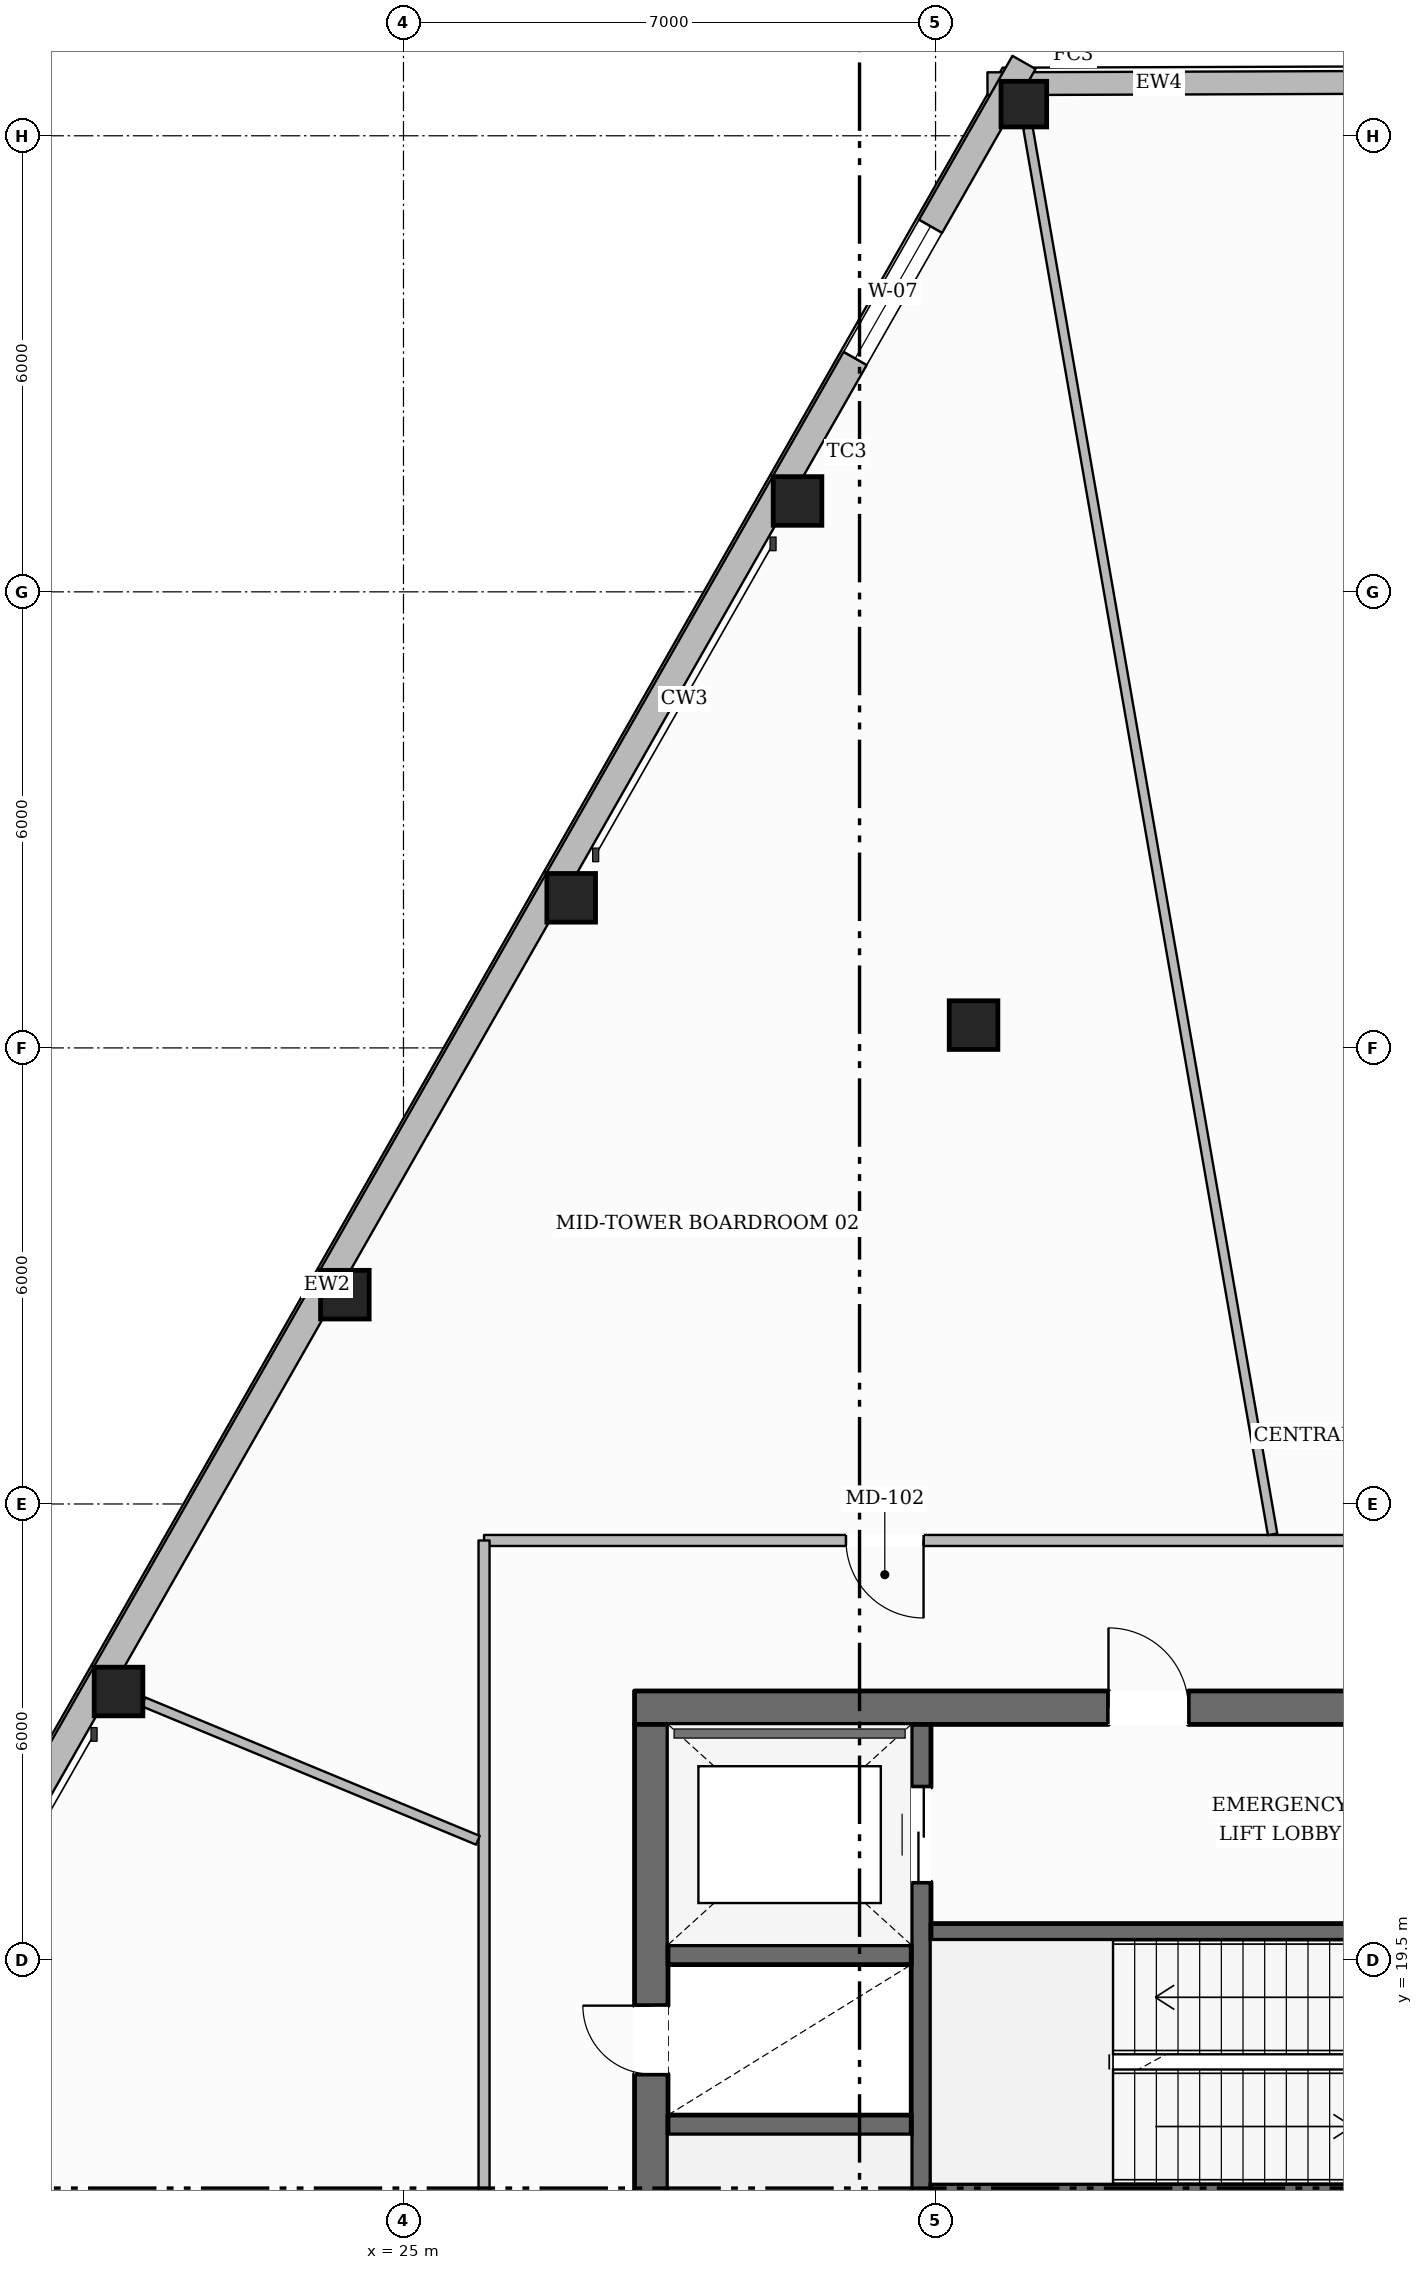
"""IFC4 building model, lengths in metres.
Left out: names, types, materials, properties, quantities, classifications, styles, units other than length and angle.
Written with IfcOpenShell. Run it as: python <this file> out.ifc"""

import sys

from ifc_helpers import new_model, si_unit, direction, frame, frame_2d, origin, origin_2d, place, context, subcontext, project, spatial, rectangle, hollow_rectangle, extrude, element, fill, save


model = new_model("IFC4")
c1 = context("Model", 3, precision=1e-05, world=origin(), true_north=direction((0.0, 1.0)))
c2 = subcontext(c1, "Body", "Model", "MODEL_VIEW")
j1 = project(units=[si_unit("LENGTHUNIT", "METRE"), si_unit("PLANEANGLEUNIT", "RADIAN")], contexts=[c1])
p1 = place(None, origin())
s1 = spatial("IfcSite", under=j1, at=p1, CompositionType="ELEMENT")
p2 = place(p1, origin())
s2 = spatial("IfcBuilding", under=s1, at=p2, CompositionType="ELEMENT")
p3 = place(p2, frame((0.0, 0.0, 160.0)))
s3 = spatial("IfcBuildingStorey", under=s2, at=p3, CompositionType="ELEMENT", Elevation=160.0)
p4 = place(p3, frame((28.04, 22.82, 0.0), z_axis=(0.0, 0.0, 1.0), x_axis=(1.0, 0.0, 0.0)))
e1 = element("IfcWall", 1, at=p4, inside=s3, PredefinedType="SOLIDWALL", context=c2, shape_type="SweptSolid", body=[
    extrude(rectangle(XDim=19.92, YDim=0.44, at=frame_2d((9.96, 0.0))), origin(), (0.0, 0.0, 1.0), 4.75),
])
p5 = place(p4, frame((6.235, 0.0, 0.0)))
e2 = element("IfcOpeningElement", 2, at=p5, cuts=e1, PredefinedType="OPENING", context=c2, shape_type="SweptSolid", body=[
    extrude(rectangle(XDim=1.05, YDim=2.15, at=frame_2d((0.525, 1.075))), frame((0.0, 0.23, 0.0), z_axis=(0.0, -1.0, 0.0), x_axis=(1.0, 0.0, 0.0)), (0.0, 0.0, 1.0), 0.46),
])
p6 = place(p4, frame((12.635, 0.0, 0.0)))
e3 = element("IfcOpeningElement", 3, at=p6, cuts=e1, PredefinedType="OPENING", context=c2, shape_type="SweptSolid", body=[
    extrude(rectangle(XDim=1.05, YDim=2.15, at=frame_2d((0.525, 1.075))), frame((0.0, 0.23, 0.0), z_axis=(0.0, -1.0, 0.0), x_axis=(1.0, 0.0, 0.0)), (0.0, 0.0, 1.0), 0.46),
])
p7 = place(p3, frame((28.26, 9.6, 0.0), z_axis=(0.0, 0.0, 1.0), x_axis=(0.0, 1.0, 0.0)))
e4 = element("IfcWall", 4, at=p7, inside=s3, PredefinedType="SOLIDWALL", context=c2, shape_type="SweptSolid", body=[
    extrude(rectangle(XDim=13.0, YDim=0.44, at=frame_2d((6.5, 0.0))), origin(), (0.0, 0.0, 1.0), 4.75),
])
p8 = place(p7, frame((0.2, 0.0, 0.0)))
e5 = element("IfcOpeningElement", 5, at=p8, cuts=e4, PredefinedType="OPENING", context=c2, shape_type="SweptSolid", body=[
    extrude(rectangle(XDim=1.1, YDim=2.15, at=frame_2d((0.55, 1.075))), frame((0.0, 0.23, 0.0), z_axis=(0.0, -1.0, 0.0), x_axis=(1.0, 0.0, 0.0)), (0.0, 0.0, 1.0), 0.46),
])
p9 = place(p7, frame((8.4, 0.0, 0.0)))
e6 = element("IfcOpeningElement", 6, at=p9, cuts=e4, PredefinedType="OPENING", context=c2, shape_type="SweptSolid", body=[
    extrude(rectangle(XDim=0.9, YDim=2.1, at=frame_2d((0.45, 1.05))), frame((0.0, 0.23, 0.0), z_axis=(0.0, -1.0, 0.0), x_axis=(1.0, 0.0, 0.0)), (0.0, 0.0, 1.0), 0.46),
])
p10 = place(p3, frame((31.81, 9.6, 0.0), z_axis=(0.0, 0.0, 1.0), x_axis=(0.0, 1.0, 0.0)))
e7 = element("IfcWall", 7, at=p10, inside=s3, PredefinedType="SHEAR", context=c2, shape_type="SweptSolid", body=[
    extrude(rectangle(XDim=13.0, YDim=0.26, at=frame_2d((6.5, 0.0))), origin(), (0.0, 0.0, 1.0), 4.75),
])
p11 = place(p10, frame((10.925, 0.0, 0.0)))
e8 = element("IfcOpeningElement", 8, at=p11, cuts=e7, PredefinedType="OPENING", context=c2, shape_type="SweptSolid", body=[
    extrude(rectangle(XDim=1.25, YDim=2.25, at=frame_2d((0.625, 1.125))), frame((0.0, 0.14, 0.0), z_axis=(0.0, -1.0, 0.0), x_axis=(1.0, 0.0, 0.0)), (0.0, 0.0, 1.0), 0.28),
])
for number, where, z_axis, x_axis in (
    (9, (28.48, 17.33, 0.0), (0.0, 0.0, 1.0), (1.0, 0.0, 0.0)),
    (10, (28.48, 19.57, 0.0), (0.0, 0.0, 1.0), (1.0, 0.0, 0.0)),
):
    element("IfcWall", number, at=place(p3, frame(where, z_axis=z_axis, x_axis=x_axis)), inside=s3, PredefinedType="SHEAR", context=c2, shape_type="SweptSolid", body=[
        extrude(rectangle(XDim=3.2, YDim=0.26, at=frame_2d((1.6, 0.0))), origin(), (0.0, 0.0, 1.0), 4.75),
    ])
p12 = place(p3, frame((31.94, 19.87, 0.0), z_axis=(0.0, 0.0, 1.0), x_axis=(1.0, 0.0, 0.0)))
e11 = element("IfcWall", 11, at=p12, inside=s3, PredefinedType="SOLIDWALL", context=c2, shape_type="SweptSolid", body=[
    extrude(rectangle(XDim=12.12, YDim=0.22, at=frame_2d((6.06, 0.0))), origin(), (0.0, 0.0, 1.0), 4.75),
])
p13 = place(p12, frame((6.3, 0.0, 0.0)))
e12 = element("IfcOpeningElement", 12, at=p13, cuts=e11, PredefinedType="OPENING", context=c2, shape_type="SweptSolid", body=[
    extrude(rectangle(XDim=1.1, YDim=2.15, at=frame_2d((0.55, 1.075))), frame((0.0, 0.12, 0.0), z_axis=(0.0, -1.0, 0.0), x_axis=(1.0, 0.0, 0.0)), (0.0, 0.0, 1.0), 0.24),
])
p14 = place(p12, frame((8.61, 0.0, 0.0)))
e13 = element("IfcOpeningElement", 13, at=p14, cuts=e11, PredefinedType="OPENING", context=c2, shape_type="SweptSolid", body=[
    extrude(rectangle(XDim=0.9, YDim=2.1, at=frame_2d((0.45, 1.05))), frame((0.0, 0.12, 0.0), z_axis=(0.0, -1.0, 0.0), x_axis=(1.0, 0.0, 0.0)), (0.0, 0.0, 1.0), 0.24),
])
p15 = place(p12, frame((10.85, 0.0, 0.0)))
e14 = element("IfcOpeningElement", 14, at=p15, cuts=e11, PredefinedType="OPENING", context=c2, shape_type="SweptSolid", body=[
    extrude(rectangle(XDim=0.9, YDim=2.1, at=frame_2d((0.45, 1.05))), frame((0.0, 0.12, 0.0), z_axis=(0.0, -1.0, 0.0), x_axis=(1.0, 0.0, 0.0)), (0.0, 0.0, 1.0), 0.24),
])
p16 = place(p3, frame((31.94, 16.45, 0.0), z_axis=(0.0, 0.0, 1.0), x_axis=(1.0, 0.0, 0.0)))
e15 = element("IfcWall", 15, at=p16, inside=s3, PredefinedType="SOLIDWALL", context=c2, shape_type="SweptSolid", body=[
    extrude(rectangle(XDim=12.12, YDim=0.22, at=frame_2d((6.06, 0.0))), origin(), (0.0, 0.0, 1.0), 4.75),
])
p17 = place(p3, frame((33.162, 43.917, 0.0), z_axis=(0.0, 0.0, 1.0), x_axis=(1.0, 0.0, 0.0)))
e16 = element("IfcColumn", 16, at=p17, inside=s3, PredefinedType="COLUMN", context=c2, shape_type="SweptSolid", body=[
    extrude(hollow_rectangle(XDim=0.6, YDim=0.6, WallThickness=0.028, at=origin_2d()), origin(), (0.0, 0.0, 1.0), 4.75),
])
for number, where, z_axis, x_axis in (
    (17, (30.184, 38.696, 0.0), (0.0, 0.0, 1.0), (1.0, 0.0, 0.0)),
    (18, (27.206, 33.475, 0.0), (0.0, 0.0, 1.0), (1.0, 0.0, 0.0)),
    (19, (24.229, 28.254, 0.0), (0.0, 0.0, 1.0), (1.0, 0.0, 0.0)),
    (20, (21.251, 23.033, 0.0), (0.0, 0.0, 1.0), (1.0, 0.0, 0.0)),
    (21, (32.5, 31.8, 0.0), (0.0, 0.0, 1.0), (1.0, 0.0, 0.0)),
):
    element("IfcColumn", number, at=place(p3, frame(where, z_axis=z_axis, x_axis=x_axis)), inside=s3, PredefinedType="COLUMN", context=c2, shape_type="SweptSolid", body=[
        extrude(hollow_rectangle(XDim=0.64, YDim=0.64, WallThickness=0.028, at=origin_2d()), origin(), (0.0, 0.0, 1.0), 4.75),
    ])
p18 = place(p3, frame((32.683, 44.185, 0.0), z_axis=(0.0, 0.0, 1.0), x_axis=(0.9999942421, 0.003393488933, 0.0)))
e22 = element("IfcWall", 22, at=p18, inside=s3, PredefinedType="STANDARD", context=c2, shape_type="SweptSolid", body=[
    extrude(rectangle(XDim=10.576, YDim=0.3, at=frame_2d((5.288, 0.0))), origin(), (0.0, 0.0, 1.0), 4.282),
])
p19 = place(p18, frame((4.763, 0.0, 0.65)))
e23 = element("IfcOpeningElement", 23, at=p19, cuts=e22, PredefinedType="OPENING", context=c2, shape_type="SweptSolid", body=[
    extrude(rectangle(XDim=1.05, YDim=1.7, at=frame_2d((0.525, 0.85))), frame((0.0, 0.16, 0.0), z_axis=(0.0, -1.0, 0.0), x_axis=(1.0, 0.0, 0.0)), (0.0, 0.0, 1.0), 0.32),
])
p20 = place(p3, frame((14.827, 12.314, 0.0), z_axis=(0.0, 0.0, 1.0), x_axis=(0.495417756307, 0.868654849026, 0.0)))
e24 = element("IfcWall", 24, at=p20, inside=s3, PredefinedType="STANDARD", context=c2, shape_type="SweptSolid", body=[
    extrude(rectangle(XDim=37.012, YDim=0.35, at=frame_2d((18.506, 0.0))), origin(), (0.0, 0.0, 1.0), 4.282),
])
p21 = place(p20, frame((32.53, 0.0, 0.65)))
e25 = element("IfcOpeningElement", 25, at=p21, cuts=e24, PredefinedType="OPENING", context=c2, shape_type="SweptSolid", body=[
    extrude(rectangle(XDim=2.0, YDim=2.25, at=frame_2d((1.0, 1.125))), frame((0.0, 0.185, 0.0), z_axis=(0.0, -1.0, 0.0), x_axis=(1.0, 0.0, 0.0)), (0.0, 0.0, 1.0), 0.37),
])
p22 = place(p20, frame((2.478, 0.0, 0.65)))
e26 = element("IfcOpeningElement", 26, at=p22, cuts=e24, PredefinedType="OPENING", context=c2, shape_type="SweptSolid", body=[
    extrude(rectangle(XDim=2.0, YDim=2.25, at=frame_2d((1.0, 1.125))), frame((0.0, 0.185, 0.0), z_axis=(0.0, -1.0, 0.0), x_axis=(1.0, 0.0, 0.0)), (0.0, 0.0, 1.0), 0.37),
])
p23 = place(p3, frame((49.94, 25.02, 0.0), z_axis=(0.0, 0.0, 1.0), x_axis=(-1.0, 0.0, 0.0)))
e27 = element("IfcWall", 27, at=p23, inside=s3, PredefinedType="PARTITIONING", context=c2, shape_type="SweptSolid", body=[
    extrude(rectangle(XDim=23.88, YDim=0.145, at=frame_2d((11.94, 0.0))), origin(), (0.0, 0.0, 1.0), 4.75),
])
p24 = place(p23, frame((6.138, 0.0, 0.0)))
e28 = element("IfcOpeningElement", 28, at=p24, cuts=e27, PredefinedType="OPENING", context=c2, shape_type="SweptSolid", body=[
    extrude(rectangle(XDim=1.4, YDim=2.2, at=frame_2d((0.7, 1.1))), frame((0.0, 0.083, 0.0), z_axis=(0.0, -1.0, 0.0), x_axis=(1.0, 0.0, 0.0)), (0.0, 0.0, 1.0), 0.165),
])
p25 = place(p23, frame((18.098, 0.0, 0.0)))
e29 = element("IfcOpeningElement", 29, at=p25, cuts=e27, PredefinedType="OPENING", context=c2, shape_type="SweptSolid", body=[
    extrude(rectangle(XDim=1.02, YDim=2.15, at=frame_2d((0.51, 1.075))), frame((0.0, 0.083, 0.0), z_axis=(0.0, -1.0, 0.0), x_axis=(1.0, 0.0, 0.0)), (0.0, 0.0, 1.0), 0.165),
])
p26 = place(p3, frame((26.06, 25.02, 0.0), z_axis=(0.0, 0.0, 1.0), x_axis=(0.0, -1.0, 0.0)))
e30 = element("IfcWall", 30, at=p26, inside=s3, PredefinedType="PARTITIONING", context=c2, shape_type="SweptSolid", body=[
    extrude(rectangle(XDim=17.84, YDim=0.145, at=frame_2d((8.92, 0.0))), origin(), (0.0, 0.0, 1.0), 4.489),
])
p27 = place(p26, frame((9.913, 0.0, 0.0)))
e31 = element("IfcOpeningElement", 31, at=p27, cuts=e30, PredefinedType="OPENING", context=c2, shape_type="SweptSolid", body=[
    extrude(rectangle(XDim=1.02, YDim=2.15, at=frame_2d((0.51, 1.075))), frame((0.0, 0.083, 0.0), z_axis=(0.0, -1.0, 0.0), x_axis=(1.0, 0.0, 0.0)), (0.0, 0.0, 1.0), 0.165),
])
p28 = place(p3, frame((36.435, 25.101, 0.0), z_axis=(0.0, 0.0, 1.0), x_axis=(-0.171366403796, 0.985207366827, 0.0)))
e32 = element("IfcWall", 32, at=p28, inside=s3, PredefinedType="PARTITIONING", context=c2, shape_type="SweptSolid", body=[
    extrude(rectangle(XDim=18.786, YDim=0.125, at=frame_2d((9.393, 0.0))), origin(), (0.0, 0.0, 1.0), 4.291),
])
p29 = place(p3, frame((25.979, 21.075, 0.0), z_axis=(0.0, 0.0, 1.0), x_axis=(-0.923966237797, 0.38247404018, 0.0)))
e33 = element("IfcWall", 33, at=p29, inside=s3, PredefinedType="PARTITIONING", context=c2, shape_type="SweptSolid", body=[
    extrude(rectangle(XDim=4.762, YDim=0.125, at=frame_2d((2.381, 0.0))), origin(), (0.0, 0.0, 1.0), 4.75),
])
p30 = place(p21, origin())
e34 = element("IfcWindow", 34, at=p30, inside=s3, PartitioningType="SINGLE_PANEL", PredefinedType="WINDOW", context=c2, shape_type="SweptSolid", body=[
    extrude(rectangle(XDim=2.0, YDim=2.25, at=frame_2d((1.0, 1.125))), frame((0.0, 0.03, 0.0), z_axis=(0.0, -1.0, 0.0), x_axis=(1.0, 0.0, 0.0)), (0.0, 0.0, 1.0), 0.06),
])
fill(e25, e34)
p31 = place(p9, origin())
e35 = element("IfcDoor", 35, at=p31, inside=s3, OperationType="SINGLE_SWING_RIGHT", PredefinedType="DOOR", context=c2, shape_type="SweptSolid", body=[
    extrude(rectangle(XDim=0.9, YDim=2.1, at=frame_2d((0.45, 1.05))), frame((0.0, 0.025, 0.0), z_axis=(0.0, -1.0, 0.0), x_axis=(1.0, 0.0, 0.0)), (0.0, 0.0, 1.0), 0.05),
])
fill(e6, e35)
p32 = place(p5, origin())
e36 = element("IfcDoor", 36, at=p32, inside=s3, OperationType="SINGLE_SWING_LEFT", PredefinedType="DOOR", context=c2, shape_type="SweptSolid", body=[
    extrude(rectangle(XDim=1.05, YDim=2.15, at=frame_2d((0.525, 1.075))), frame((0.0, 0.025, 0.0), z_axis=(0.0, -1.0, 0.0), x_axis=(1.0, 0.0, 0.0)), (0.0, 0.0, 1.0), 0.05),
])
fill(e2, e36)
p33 = place(p11, origin())
e37 = element("IfcDoor", 37, at=p33, inside=s3, OperationType="DOUBLE_DOOR_SLIDING", PredefinedType="DOOR", context=c2, shape_type="SweptSolid", body=[
    extrude(rectangle(XDim=1.25, YDim=2.25, at=frame_2d((0.625, 1.125))), frame((0.0, 0.025, 0.0), z_axis=(0.0, -1.0, 0.0), x_axis=(1.0, 0.0, 0.0)), (0.0, 0.0, 1.0), 0.05),
])
fill(e8, e37)
p34 = place(p25, origin())
e38 = element("IfcDoor", 38, at=p34, inside=s3, OperationType="SINGLE_SWING_LEFT", PredefinedType="DOOR", context=c2, shape_type="SweptSolid", body=[
    extrude(rectangle(XDim=1.02, YDim=2.15, at=frame_2d((0.51, 1.075))), frame((0.0, 0.025, 0.0), z_axis=(0.0, -1.0, 0.0), x_axis=(1.0, 0.0, 0.0)), (0.0, 0.0, 1.0), 0.05),
])
fill(e29, e38)
save(model, sys.argv[1])
